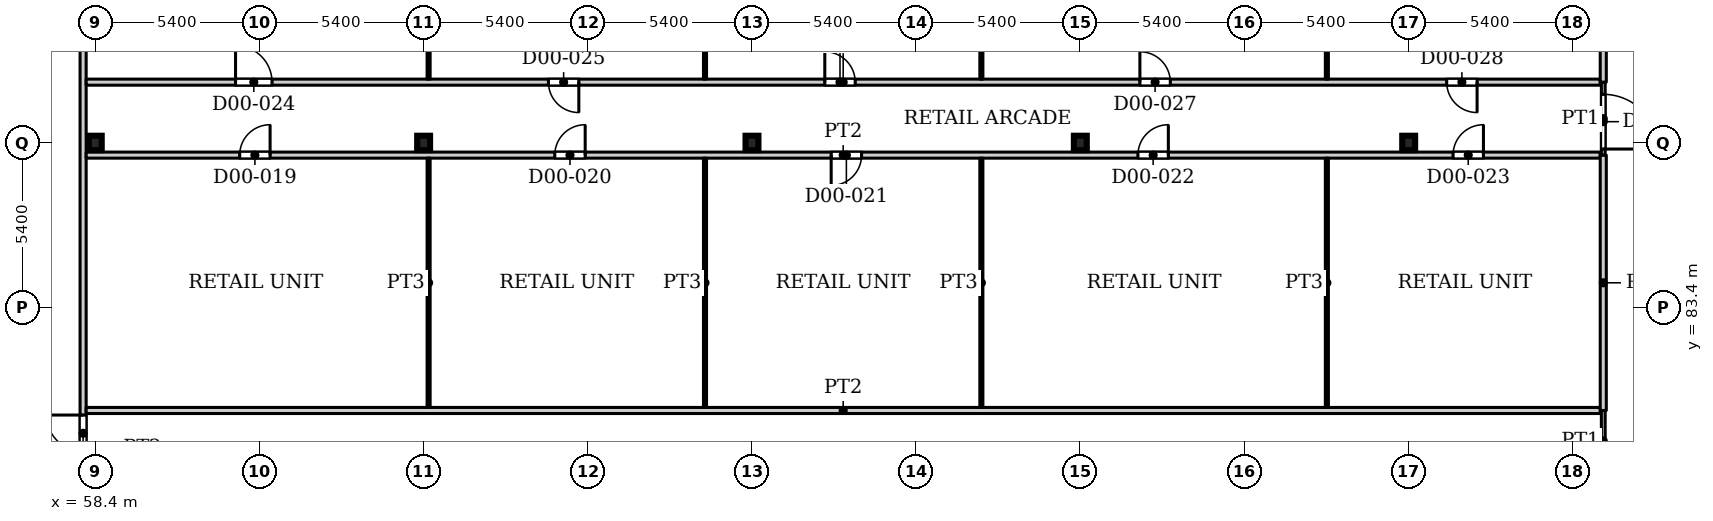
"""IFC4 building model, lengths in metres.
Left out: names, types, materials, properties, quantities, classifications, styles, units other than length and angle.
Written with IfcOpenShell. Run it as: python <this file> out.ifc"""

import sys

from ifc_helpers import new_model, si_unit, direction, frame, frame_2d, origin, origin_2d, place, context, subcontext, project, spatial, rectangle, i_section, extrude, source, transform, mapped, element, fill, save


model = new_model("IFC4")
c1 = context("Model", 3, precision=1e-05, world=origin(), true_north=direction((0.0, 1.0)))
c2 = subcontext(c1, "Body", "Model", "MODEL_VIEW")
j1 = project(units=[si_unit("LENGTHUNIT", "METRE"), si_unit("PLANEANGLEUNIT", "RADIAN")], contexts=[c1])
p1 = place(None, origin())
s1 = spatial("IfcSite", under=j1, at=p1, CompositionType="ELEMENT")
p2 = place(p1, origin())
s2 = spatial("IfcBuilding", under=s1, at=p2, CompositionType="ELEMENT")
p3 = place(p2, origin())
s3 = spatial("IfcBuildingStorey", under=s2, at=p3, CompositionType="ELEMENT", Elevation=0.0)
for number, where, z_axis, x_axis in (
    (1, (58.4, 88.8, 0.0), (0.0, 0.0, 1.0), (1.0, 0.0, 0.0)),
    (2, (69.2, 88.8, 0.0), (0.0, 0.0, 1.0), (1.0, 0.0, 0.0)),
    (3, (80.0, 88.8, 0.0), (0.0, 0.0, 1.0), (1.0, 0.0, 0.0)),
    (4, (90.8, 88.8, 0.0), (0.0, 0.0, 1.0), (1.0, 0.0, 0.0)),
    (5, (101.6, 88.8, 0.0), (0.0, 0.0, 1.0), (1.0, 0.0, 0.0)),
):
    element("IfcColumn", number, at=place(p3, frame(where, z_axis=z_axis, x_axis=x_axis)), inside=s3, PredefinedType="COLUMN", context=c2, shape_type="SweptSolid", body=[
        extrude(i_section(OverallWidth=0.424, OverallDepth=0.474, WebThickness=0.048, FlangeThickness=0.077, FilletRadius=0.014, at=origin_2d()), origin(), (0.0, 0.0, 1.0), 7.5),
    ])
p4 = place(p3, frame((58.0, 78.1, 0.0), z_axis=(0.0, 0.0, 1.0), x_axis=(0.0, 1.0, 0.0)))
e6 = element("IfcWall", 6, at=p4, inside=s3, PredefinedType="PARTITIONING", context=c2, shape_type="SweptSolid", body=[
    extrude(rectangle(XDim=31.9, YDim=0.2, at=frame_2d((15.95, 0.0))), origin(), (0.0, 0.0, 1.0), 7.08),
])
p5 = place(p4, frame((0.55, 0.0, 0.0)))
e7 = element("IfcOpeningElement", 7, at=p5, cuts=e6, PredefinedType="OPENING", context=c2, shape_type="SweptSolid", body=[
    extrude(rectangle(XDim=1.2, YDim=2.1, at=frame_2d((0.6, 1.05))), frame((0.0, 0.11, 0.0), z_axis=(0.0, -1.0, 0.0), x_axis=(1.0, 0.0, 0.0)), (0.0, 0.0, 1.0), 0.22),
])
p6 = place(p3, frame((58.1, 80.0, 0.0), z_axis=(0.0, 0.0, 1.0), x_axis=(1.0, 0.0, 0.0)))
e8 = element("IfcWall", 8, at=p6, inside=s3, PredefinedType="PARTITIONING", context=c2, shape_type="SweptSolid", body=[
    extrude(rectangle(XDim=49.8, YDim=0.2, at=frame_2d((24.9, 0.0))), origin(), (0.0, 0.0, 1.0), 7.08),
])
p7 = place(p3, frame((58.1, 88.4, 0.0), z_axis=(0.0, 0.0, 1.0), x_axis=(1.0, 0.0, 0.0)))
e9 = element("IfcWall", 9, at=p7, inside=s3, PredefinedType="PARTITIONING", context=c2, shape_type="SweptSolid", body=[
    extrude(rectangle(XDim=49.8, YDim=0.2, at=frame_2d((24.9, 0.0))), origin(), (0.0, 0.0, 1.0), 7.08),
])
p8 = place(p7, frame((5.05, 0.0, 0.0)))
e10 = element("IfcOpeningElement", 10, at=p8, cuts=e9, PredefinedType="OPENING", context=c2, shape_type="SweptSolid", body=[
    extrude(rectangle(XDim=1.0, YDim=2.1, at=frame_2d((0.5, 1.05))), frame((0.0, 0.11, 0.0), z_axis=(0.0, -1.0, 0.0), x_axis=(1.0, 0.0, 0.0)), (0.0, 0.0, 1.0), 0.22),
])
p9 = place(p7, frame((15.414, 0.0, 0.0)))
e11 = element("IfcOpeningElement", 11, at=p9, cuts=e9, PredefinedType="OPENING", context=c2, shape_type="SweptSolid", body=[
    extrude(rectangle(XDim=1.0, YDim=2.1, at=frame_2d((0.5, 1.05))), frame((0.0, 0.11, 0.0), z_axis=(0.0, -1.0, 0.0), x_axis=(1.0, 0.0, 0.0)), (0.0, 0.0, 1.0), 0.22),
])
p10 = place(p7, frame((24.505, 0.0, 0.0)))
e12 = element("IfcOpeningElement", 12, at=p10, cuts=e9, PredefinedType="OPENING", context=c2, shape_type="SweptSolid", body=[
    extrude(rectangle(XDim=1.0, YDim=2.1, at=frame_2d((0.5, 1.05))), frame((0.0, 0.11, 0.0), z_axis=(0.0, -1.0, 0.0), x_axis=(1.0, 0.0, 0.0)), (0.0, 0.0, 1.0), 0.22),
])
p11 = place(p7, frame((34.595, 0.0, 0.0)))
e13 = element("IfcOpeningElement", 13, at=p11, cuts=e9, PredefinedType="OPENING", context=c2, shape_type="SweptSolid", body=[
    extrude(rectangle(XDim=1.0, YDim=2.1, at=frame_2d((0.5, 1.05))), frame((0.0, 0.11, 0.0), z_axis=(0.0, -1.0, 0.0), x_axis=(1.0, 0.0, 0.0)), (0.0, 0.0, 1.0), 0.22),
])
p12 = place(p7, frame((44.959, 0.0, 0.0)))
e14 = element("IfcOpeningElement", 14, at=p12, cuts=e9, PredefinedType="OPENING", context=c2, shape_type="SweptSolid", body=[
    extrude(rectangle(XDim=1.0, YDim=2.1, at=frame_2d((0.5, 1.05))), frame((0.0, 0.11, 0.0), z_axis=(0.0, -1.0, 0.0), x_axis=(1.0, 0.0, 0.0)), (0.0, 0.0, 1.0), 0.22),
])
p13 = place(p3, frame((58.1, 90.8, 0.0), z_axis=(0.0, 0.0, 1.0), x_axis=(1.0, 0.0, 0.0)))
e15 = element("IfcWall", 15, at=p13, inside=s3, PredefinedType="PARTITIONING", context=c2, shape_type="SweptSolid", body=[
    extrude(rectangle(XDim=49.8, YDim=0.2, at=frame_2d((24.9, 0.0))), origin(), (0.0, 0.0, 1.0), 7.08),
])
p14 = place(p13, frame((4.914, 0.0, 0.0)))
e16 = element("IfcOpeningElement", 16, at=p14, cuts=e15, PredefinedType="OPENING", context=c2, shape_type="SweptSolid", body=[
    extrude(rectangle(XDim=1.2, YDim=2.1, at=frame_2d((0.6, 1.05))), frame((0.0, 0.11, 0.0), z_axis=(0.0, -1.0, 0.0), x_axis=(1.0, 0.0, 0.0)), (0.0, 0.0, 1.0), 0.22),
])
p15 = place(p13, frame((15.205, 0.0, 0.0)))
e17 = element("IfcOpeningElement", 17, at=p15, cuts=e15, PredefinedType="OPENING", context=c2, shape_type="SweptSolid", body=[
    extrude(rectangle(XDim=1.0, YDim=2.1, at=frame_2d((0.5, 1.05))), frame((0.0, 0.11, 0.0), z_axis=(0.0, -1.0, 0.0), x_axis=(1.0, 0.0, 0.0)), (0.0, 0.0, 1.0), 0.22),
])
p16 = place(p13, frame((24.295, 0.0, 0.0)))
e18 = element("IfcOpeningElement", 18, at=p16, cuts=e15, PredefinedType="OPENING", context=c2, shape_type="SweptSolid", body=[
    extrude(rectangle(XDim=1.0, YDim=2.1, at=frame_2d((0.5, 1.05))), frame((0.0, 0.11, 0.0), z_axis=(0.0, -1.0, 0.0), x_axis=(1.0, 0.0, 0.0)), (0.0, 0.0, 1.0), 0.22),
])
p17 = place(p13, frame((34.659, 0.0, 0.0)))
e19 = element("IfcOpeningElement", 19, at=p17, cuts=e15, PredefinedType="OPENING", context=c2, shape_type="SweptSolid", body=[
    extrude(rectangle(XDim=1.0, YDim=2.1, at=frame_2d((0.5, 1.05))), frame((0.0, 0.11, 0.0), z_axis=(0.0, -1.0, 0.0), x_axis=(1.0, 0.0, 0.0)), (0.0, 0.0, 1.0), 0.22),
])
p18 = place(p13, frame((44.75, 0.0, 0.0)))
e20 = element("IfcOpeningElement", 20, at=p18, cuts=e15, PredefinedType="OPENING", context=c2, shape_type="SweptSolid", body=[
    extrude(rectangle(XDim=1.0, YDim=2.1, at=frame_2d((0.5, 1.05))), frame((0.0, 0.11, 0.0), z_axis=(0.0, -1.0, 0.0), x_axis=(1.0, 0.0, 0.0)), (0.0, 0.0, 1.0), 0.22),
])
p19 = place(p3, frame((69.364, 80.1, 0.0), z_axis=(0.0, 0.0, 1.0), x_axis=(0.0, 1.0, 0.0)))
e21 = element("IfcWall", 21, at=p19, inside=s3, PredefinedType="PARTITIONING", context=c2, shape_type="SweptSolid", body=[
    extrude(rectangle(XDim=8.2, YDim=0.1, at=frame_2d((4.1, 0.0))), origin(), (0.0, 0.0, 1.0), 7.08),
])
p20 = place(p3, frame((69.364, 90.9, 0.0), z_axis=(0.0, 0.0, 1.0), x_axis=(0.0, 1.0, 0.0)))
e22 = element("IfcWall", 22, at=p20, inside=s3, PredefinedType="PARTITIONING", context=c2, shape_type="SweptSolid", body=[
    extrude(rectangle(XDim=19.1, YDim=0.1, at=frame_2d((9.55, 0.0))), origin(), (0.0, 0.0, 1.0), 7.08),
])
p21 = place(p3, frame((78.455, 80.1, 0.0), z_axis=(0.0, 0.0, 1.0), x_axis=(0.0, 1.0, 0.0)))
e23 = element("IfcWall", 23, at=p21, inside=s3, PredefinedType="PARTITIONING", context=c2, shape_type="SweptSolid", body=[
    extrude(rectangle(XDim=8.2, YDim=0.1, at=frame_2d((4.1, 0.0))), origin(), (0.0, 0.0, 1.0), 7.08),
])
p22 = place(p3, frame((78.455, 90.9, 0.0), z_axis=(0.0, 0.0, 1.0), x_axis=(0.0, 1.0, 0.0)))
e24 = element("IfcWall", 24, at=p22, inside=s3, PredefinedType="PARTITIONING", context=c2, shape_type="SweptSolid", body=[
    extrude(rectangle(XDim=19.1, YDim=0.1, at=frame_2d((9.55, 0.0))), origin(), (0.0, 0.0, 1.0), 7.08),
])
p23 = place(p3, frame((87.545, 80.1, 0.0), z_axis=(0.0, 0.0, 1.0), x_axis=(0.0, 1.0, 0.0)))
e25 = element("IfcWall", 25, at=p23, inside=s3, PredefinedType="PARTITIONING", context=c2, shape_type="SweptSolid", body=[
    extrude(rectangle(XDim=8.2, YDim=0.1, at=frame_2d((4.1, 0.0))), origin(), (0.0, 0.0, 1.0), 7.08),
])
p24 = place(p3, frame((87.545, 90.9, 0.0), z_axis=(0.0, 0.0, 1.0), x_axis=(0.0, 1.0, 0.0)))
e26 = element("IfcWall", 26, at=p24, inside=s3, PredefinedType="PARTITIONING", context=c2, shape_type="SweptSolid", body=[
    extrude(rectangle(XDim=19.1, YDim=0.1, at=frame_2d((9.55, 0.0))), origin(), (0.0, 0.0, 1.0), 7.08),
])
p25 = place(p3, frame((98.909, 80.1, 0.0), z_axis=(0.0, 0.0, 1.0), x_axis=(0.0, 1.0, 0.0)))
e27 = element("IfcWall", 27, at=p25, inside=s3, PredefinedType="PARTITIONING", context=c2, shape_type="SweptSolid", body=[
    extrude(rectangle(XDim=8.2, YDim=0.1, at=frame_2d((4.1, 0.0))), origin(), (0.0, 0.0, 1.0), 7.08),
])
p26 = place(p3, frame((98.909, 90.9, 0.0), z_axis=(0.0, 0.0, 1.0), x_axis=(0.0, 1.0, 0.0)))
e28 = element("IfcWall", 28, at=p26, inside=s3, PredefinedType="PARTITIONING", context=c2, shape_type="SweptSolid", body=[
    extrude(rectangle(XDim=18.801, YDim=0.1, at=frame_2d((9.4, 0.0))), origin(), (0.0, 0.0, 1.0), 7.08),
])
p27 = place(p3, frame((108.0, 78.0, 0.0), z_axis=(0.0, 0.0, 1.0), x_axis=(0.0, 1.0, 0.0)))
e29 = element("IfcWall", 29, at=p27, inside=s3, PredefinedType="PARTITIONING", context=c2, shape_type="SweptSolid", body=[
    extrude(rectangle(XDim=2.0, YDim=0.125, at=frame_2d((1.0, 0.0))), origin(), (0.0, 0.0, 1.0), 7.08),
])
p28 = place(p3, frame((108.0, 80.0, 0.0), z_axis=(0.0, 0.0, 1.0), x_axis=(0.0, 1.0, 0.0)))
e30 = element("IfcWall", 30, at=p28, inside=s3, PredefinedType="PARTITIONING", context=c2, shape_type="SweptSolid", body=[
    extrude(rectangle(XDim=8.4, YDim=0.2, at=frame_2d((4.2, 0.0))), origin(), (0.0, 0.0, 1.0), 7.08),
])
p29 = place(p3, frame((108.0, 88.4, 0.0), z_axis=(0.0, 0.0, 1.0), x_axis=(0.0, 1.0, 0.0)))
e31 = element("IfcWall", 31, at=p29, inside=s3, PredefinedType="PARTITIONING", context=c2, shape_type="SweptSolid", body=[
    extrude(rectangle(XDim=2.4, YDim=0.125, at=frame_2d((1.2, 0.0))), origin(), (0.0, 0.0, 1.0), 7.08),
])
p30 = place(p29, frame((0.2, 0.0, 0.0)))
e32 = element("IfcOpeningElement", 32, at=p30, cuts=e31, PredefinedType="OPENING", context=c2, shape_type="SweptSolid", body=[
    extrude(rectangle(XDim=1.8, YDim=2.1, at=frame_2d((0.9, 1.05))), frame((0.0, 0.073, 0.0), z_axis=(0.0, -1.0, 0.0), x_axis=(1.0, 0.0, 0.0)), (0.0, 0.0, 1.0), 0.145),
])
p31 = place(p3, frame((108.0, 90.8, 0.0), z_axis=(0.0, 0.0, 1.0), x_axis=(0.0, 1.0, 0.0)))
e33 = element("IfcWall", 33, at=p31, inside=s3, PredefinedType="PARTITIONING", context=c2, shape_type="SweptSolid", body=[
    extrude(rectangle(XDim=17.2, YDim=0.2, at=frame_2d((8.6, 0.0))), origin(), (0.0, 0.0, 1.0), 7.08),
])
m1 = source(origin(), c2, "Body", "SweptSolid", [
    extrude(rectangle(XDim=1.2, YDim=2.1, at=frame_2d((0.6, 1.05))), frame((0.0, 0.025, 0.0), z_axis=(0.0, -1.0, 0.0), x_axis=(1.0, 0.0, 0.0)), (0.0, 0.0, 1.0), 0.05),
])
p32 = place(p5, origin())
e34 = element("IfcDoor", 34, at=p32, inside=s3, OperationType="SINGLE_SWING_LEFT", PredefinedType="DOOR", context=c2, shape_type="MappedRepresentation", body=[
    mapped(m1, transform((0.0, 0.0, 0.0), x_axis=(1.0, 0.0, 0.0), y_axis=(0.0, 1.0, 0.0), z_axis=(0.0, 0.0, 1.0), scale=1.0)),
])
fill(e7, e34)
m2 = source(origin(), c2, "Body", "SweptSolid", [
    extrude(rectangle(XDim=1.0, YDim=2.1, at=frame_2d((0.5, 1.05))), frame((0.0, 0.025, 0.0), z_axis=(0.0, -1.0, 0.0), x_axis=(1.0, 0.0, 0.0)), (0.0, 0.0, 1.0), 0.05),
])
p33 = place(p8, origin())
e35 = element("IfcDoor", 35, at=p33, inside=s3, OperationType="SINGLE_SWING_LEFT", PredefinedType="DOOR", context=c2, shape_type="MappedRepresentation", body=[
    mapped(m2, transform((0.0, 0.0, 0.0), x_axis=(1.0, 0.0, 0.0), y_axis=(0.0, 1.0, 0.0), z_axis=(0.0, 0.0, 1.0), scale=1.0)),
])
fill(e10, e35)
p34 = place(p9, origin())
e36 = element("IfcDoor", 36, at=p34, inside=s3, OperationType="SINGLE_SWING_LEFT", PredefinedType="DOOR", context=c2, shape_type="MappedRepresentation", body=[
    mapped(m2, transform((0.0, 0.0, 0.0), x_axis=(1.0, 0.0, 0.0), y_axis=(0.0, 1.0, 0.0), z_axis=(0.0, 0.0, 1.0), scale=1.0)),
])
fill(e11, e36)
p35 = place(p10, origin())
e37 = element("IfcDoor", 37, at=p35, inside=s3, OperationType="SINGLE_SWING_RIGHT", PredefinedType="DOOR", context=c2, shape_type="MappedRepresentation", body=[
    mapped(m2, transform((0.0, 0.0, 0.0), x_axis=(1.0, 0.0, 0.0), y_axis=(0.0, 1.0, 0.0), z_axis=(0.0, 0.0, 1.0), scale=1.0)),
])
fill(e12, e37)
p36 = place(p11, origin())
e38 = element("IfcDoor", 38, at=p36, inside=s3, OperationType="SINGLE_SWING_LEFT", PredefinedType="DOOR", context=c2, shape_type="MappedRepresentation", body=[
    mapped(m2, transform((0.0, 0.0, 0.0), x_axis=(1.0, 0.0, 0.0), y_axis=(0.0, 1.0, 0.0), z_axis=(0.0, 0.0, 1.0), scale=1.0)),
])
fill(e13, e38)
p37 = place(p12, origin())
e39 = element("IfcDoor", 39, at=p37, inside=s3, OperationType="SINGLE_SWING_LEFT", PredefinedType="DOOR", context=c2, shape_type="MappedRepresentation", body=[
    mapped(m2, transform((0.0, 0.0, 0.0), x_axis=(1.0, 0.0, 0.0), y_axis=(0.0, 1.0, 0.0), z_axis=(0.0, 0.0, 1.0), scale=1.0)),
])
fill(e14, e39)
p38 = place(p14, origin())
e40 = element("IfcDoor", 40, at=p38, inside=s3, OperationType="SINGLE_SWING_LEFT", PredefinedType="DOOR", context=c2, shape_type="MappedRepresentation", body=[
    mapped(m1, transform((0.0, 0.0, 0.0), x_axis=(1.0, 0.0, 0.0), y_axis=(0.0, 1.0, 0.0), z_axis=(0.0, 0.0, 1.0), scale=1.0)),
])
fill(e16, e40)
p39 = place(p15, origin())
e41 = element("IfcDoor", 41, at=p39, inside=s3, OperationType="SINGLE_SWING_RIGHT", PredefinedType="DOOR", context=c2, shape_type="MappedRepresentation", body=[
    mapped(m2, transform((0.0, 0.0, 0.0), x_axis=(1.0, 0.0, 0.0), y_axis=(0.0, 1.0, 0.0), z_axis=(0.0, 0.0, 1.0), scale=1.0)),
])
fill(e17, e41)
p40 = place(p16, origin())
e42 = element("IfcDoor", 42, at=p40, inside=s3, OperationType="SINGLE_SWING_LEFT", PredefinedType="DOOR", context=c2, shape_type="MappedRepresentation", body=[
    mapped(m2, transform((0.0, 0.0, 0.0), x_axis=(1.0, 0.0, 0.0), y_axis=(0.0, 1.0, 0.0), z_axis=(0.0, 0.0, 1.0), scale=1.0)),
])
fill(e18, e42)
p41 = place(p17, origin())
e43 = element("IfcDoor", 43, at=p41, inside=s3, OperationType="SINGLE_SWING_LEFT", PredefinedType="DOOR", context=c2, shape_type="MappedRepresentation", body=[
    mapped(m2, transform((0.0, 0.0, 0.0), x_axis=(1.0, 0.0, 0.0), y_axis=(0.0, 1.0, 0.0), z_axis=(0.0, 0.0, 1.0), scale=1.0)),
])
fill(e19, e43)
p42 = place(p18, origin())
e44 = element("IfcDoor", 44, at=p42, inside=s3, OperationType="SINGLE_SWING_RIGHT", PredefinedType="DOOR", context=c2, shape_type="MappedRepresentation", body=[
    mapped(m2, transform((0.0, 0.0, 0.0), x_axis=(1.0, 0.0, 0.0), y_axis=(0.0, 1.0, 0.0), z_axis=(0.0, 0.0, 1.0), scale=1.0)),
])
fill(e20, e44)
m3 = source(origin(), c2, "Body", "SweptSolid", [
    extrude(rectangle(XDim=1.8, YDim=2.1, at=frame_2d((0.9, 1.05))), frame((0.0, 0.025, 0.0), z_axis=(0.0, -1.0, 0.0), x_axis=(1.0, 0.0, 0.0)), (0.0, 0.0, 1.0), 0.05),
])
p43 = place(p30, origin())
e45 = element("IfcDoor", 45, at=p43, inside=s3, OperationType="DOUBLE_DOOR_SINGLE_SWING", PredefinedType="DOOR", context=c2, shape_type="MappedRepresentation", body=[
    mapped(m3, transform((0.0, 0.0, 0.0), x_axis=(1.0, 0.0, 0.0), y_axis=(0.0, 1.0, 0.0), z_axis=(0.0, 0.0, 1.0), scale=1.0)),
])
fill(e32, e45)
save(model, sys.argv[1])
